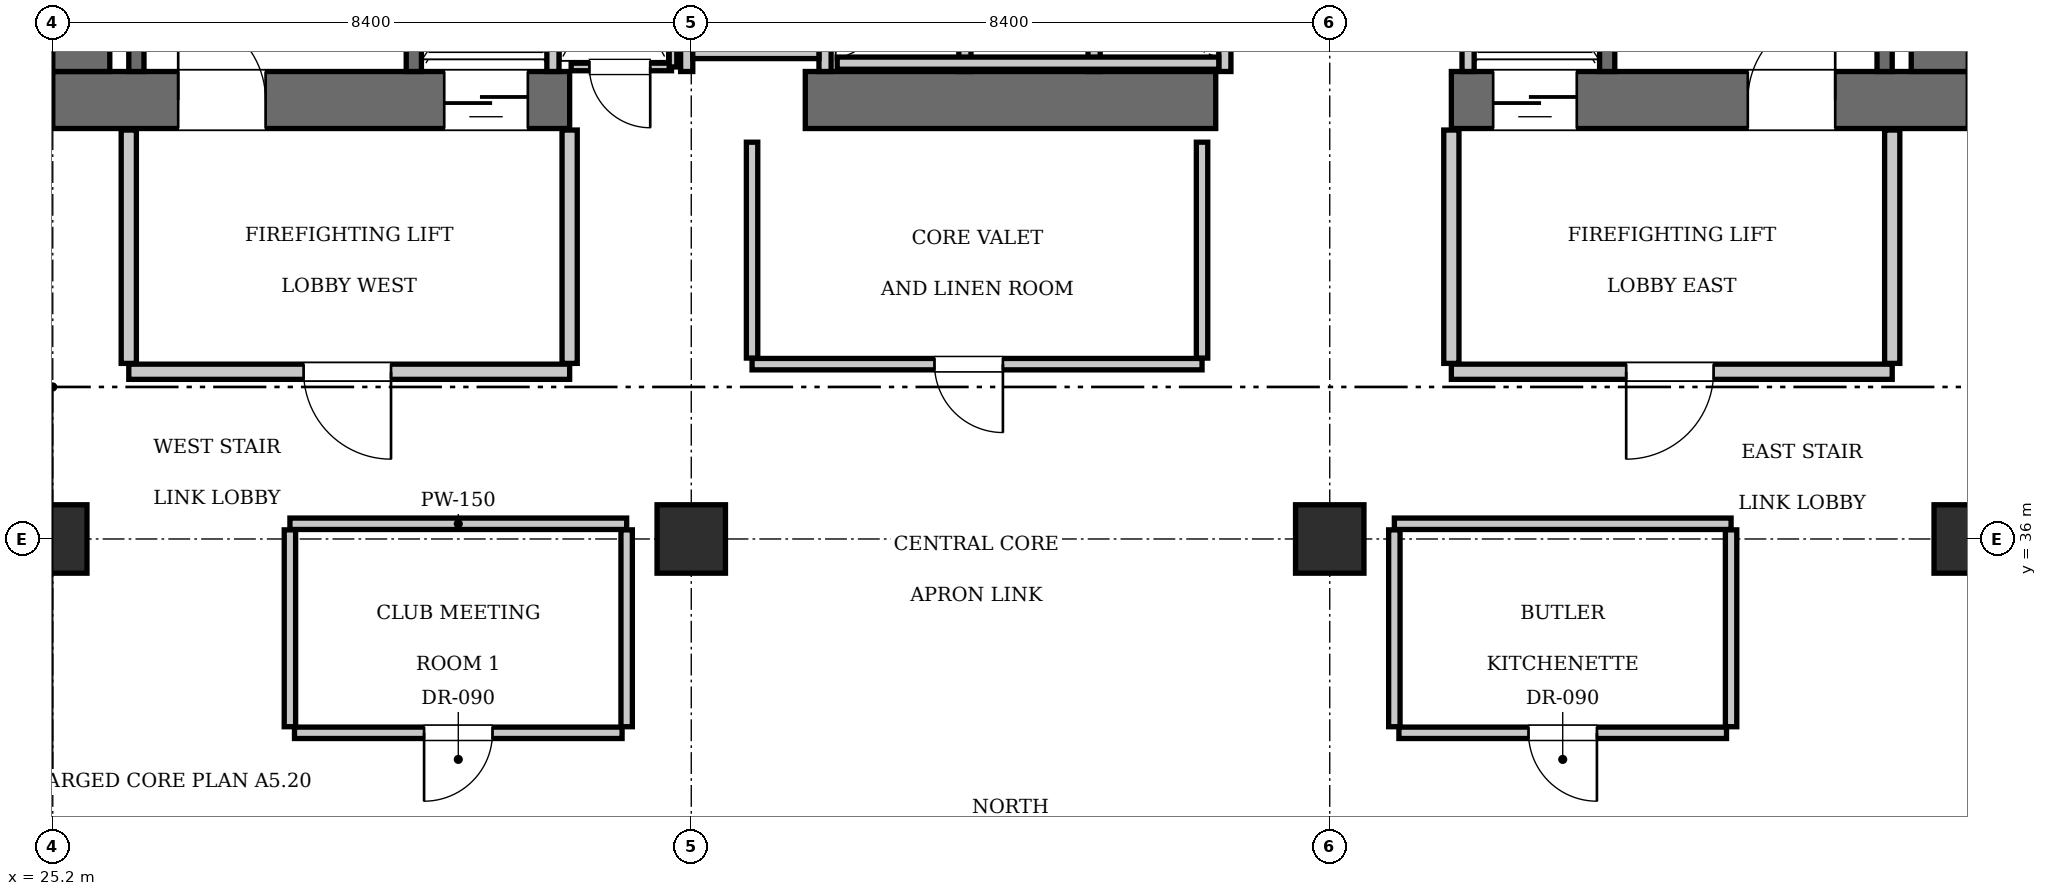
"""IFC4 building model, lengths in metres.
Left out: names, types, materials, properties, quantities, classifications, styles, units other than length and angle.
Written with IfcOpenShell. Run it as: python <this file> out.ifc"""

import sys

from ifc_helpers import new_model, si_unit, direction, frame, frame_2d, origin, origin_2d, place, context, subcontext, project, spatial, rectangle, extrude, element, fill, save


model = new_model("IFC4")
c1 = context("Model", 3, precision=1e-05, world=origin(), true_north=direction((0.0, 1.0)))
c2 = subcontext(c1, "Body", "Model", "MODEL_VIEW")
j1 = project(units=[si_unit("LENGTHUNIT", "METRE"), si_unit("PLANEANGLEUNIT", "RADIAN")], contexts=[c1])
p1 = place(None, origin())
s1 = spatial("IfcSite", under=j1, at=p1, CompositionType="ELEMENT")
p2 = place(p1, origin())
s2 = spatial("IfcBuilding", under=s1, at=p2, CompositionType="ELEMENT")
p3 = place(p2, frame((0.0, 0.0, 138.95)))
s3 = spatial("IfcBuildingStorey", under=s2, at=p3, CompositionType="ELEMENT", Elevation=138.95)
p4 = place(p3, frame((25.2, 41.775, 0.0), z_axis=(0.0, 0.0, 1.0), x_axis=(1.0, 0.0, 0.0)))
e1 = element("IfcWall", 1, at=p4, inside=s3, PredefinedType="SHEAR", context=c2, shape_type="SweptSolid", body=[
    extrude(rectangle(XDim=6.8, YDim=0.75, at=frame_2d((3.4, 0.0))), origin(), (0.0, 0.0, 1.0), 3.85),
])
p5 = place(p4, frame((1.65, 0.0, 0.0)))
e2 = element("IfcOpeningElement", 2, at=p5, cuts=e1, PredefinedType="OPENING", context=c2, shape_type="SweptSolid", body=[
    extrude(rectangle(XDim=1.15, YDim=2.15, at=frame_2d((0.575, 1.075))), frame((0.0, 0.385, 0.0), z_axis=(0.0, -1.0, 0.0), x_axis=(1.0, 0.0, 0.0)), (0.0, 0.0, 1.0), 0.77),
])
p6 = place(p4, frame((5.15, 0.0, 0.0)))
e3 = element("IfcOpeningElement", 3, at=p6, cuts=e1, PredefinedType="OPENING", context=c2, shape_type="SweptSolid", body=[
    extrude(rectangle(XDim=1.1, YDim=2.2, at=frame_2d((0.55, 1.1))), frame((0.0, 0.385, 0.0), z_axis=(0.0, -1.0, 0.0), x_axis=(1.0, 0.0, 0.0)), (0.0, 0.0, 1.0), 0.77),
])
p7 = place(p3, frame((35.1, 41.775, 0.0), z_axis=(0.0, 0.0, 1.0), x_axis=(1.0, 0.0, 0.0)))
e4 = element("IfcWall", 4, at=p7, inside=s3, PredefinedType="SHEAR", context=c2, shape_type="SweptSolid", body=[
    extrude(rectangle(XDim=5.4, YDim=0.75, at=frame_2d((2.7, 0.0))), origin(), (0.0, 0.0, 1.0), 3.85),
])
p8 = place(p3, frame((43.6, 41.775, 0.0), z_axis=(0.0, 0.0, 1.0), x_axis=(1.0, 0.0, 0.0)))
e5 = element("IfcWall", 5, at=p8, inside=s3, PredefinedType="SHEAR", context=c2, shape_type="SweptSolid", body=[
    extrude(rectangle(XDim=6.8, YDim=0.75, at=frame_2d((3.4, 0.0))), origin(), (0.0, 0.0, 1.0), 3.85),
])
p9 = place(p8, frame((3.9, 0.0, 0.0)))
e6 = element("IfcOpeningElement", 6, at=p9, cuts=e5, PredefinedType="OPENING", context=c2, shape_type="SweptSolid", body=[
    extrude(rectangle(XDim=1.15, YDim=2.15, at=frame_2d((0.575, 1.075))), frame((0.0, 0.385, 0.0), z_axis=(0.0, -1.0, 0.0), x_axis=(1.0, 0.0, 0.0)), (0.0, 0.0, 1.0), 0.77),
])
p10 = place(p8, frame((0.55, 0.0, 0.0)))
e7 = element("IfcOpeningElement", 7, at=p10, cuts=e5, PredefinedType="OPENING", context=c2, shape_type="SweptSolid", body=[
    extrude(rectangle(XDim=1.1, YDim=2.2, at=frame_2d((0.55, 1.1))), frame((0.0, 0.385, 0.0), z_axis=(0.0, -1.0, 0.0), x_axis=(1.0, 0.0, 0.0)), (0.0, 0.0, 1.0), 0.77),
])
for number, where, z_axis, x_axis in (
    (8, (25.575, 42.15, 0.0), (0.0, 0.0, 1.0), (0.0, 1.0, 0.0)),
    (9, (50.025, 42.15, 0.0), (0.0, 0.0, 1.0), (0.0, 1.0, 0.0)),
):
    element("IfcWall", number, at=place(p3, frame(where, z_axis=z_axis, x_axis=x_axis)), inside=s3, PredefinedType="SHEAR", context=c2, shape_type="SweptSolid", body=[
        extrude(rectangle(XDim=1.9, YDim=0.75, at=frame_2d((0.95, 0.0))), origin(), (0.0, 0.0, 1.0), 3.85),
    ])
for number, where, z_axis, x_axis in (
    (10, (25.2, 36.0, 0.0), (0.0, 0.0, 1.0), (1.0, 0.0, 0.0)),
    (11, (33.6, 36.0, 0.0), (0.0, 0.0, 1.0), (1.0, 0.0, 0.0)),
    (12, (42.0, 36.0, 0.0), (0.0, 0.0, 1.0), (1.0, 0.0, 0.0)),
    (13, (50.4, 36.0, 0.0), (0.0, 0.0, 1.0), (1.0, 0.0, 0.0)),
):
    element("IfcColumn", number, at=place(p3, frame(where, z_axis=z_axis, x_axis=x_axis)), inside=s3, PredefinedType="COLUMN", context=c2, shape_type="SweptSolid", body=[
        extrude(rectangle(XDim=0.9, YDim=0.9, at=origin_2d()), origin(), (0.0, 0.0, 1.0), 3.85),
    ])
p11 = place(p3, frame((29.95, 42.15, 0.0), z_axis=(0.0, 0.0, 1.0), x_axis=(0.0, 1.0, 0.0)))
e14 = element("IfcWall", 14, at=p11, inside=s3, PredefinedType="SOLIDWALL", context=c2, shape_type="SweptSolid", body=[
    extrude(rectangle(XDim=9.0, YDim=0.2, at=frame_2d((4.5, 0.0))), origin(), (0.0, 0.0, 1.0), 3.61),
])
p12 = place(p3, frame((26.3, 42.15, 0.0), z_axis=(0.0, 0.0, 1.0), x_axis=(0.0, 1.0, 0.0)))
e15 = element("IfcWall", 15, at=p12, inside=s3, PredefinedType="SOLIDWALL", context=c2, shape_type="SweptSolid", body=[
    extrude(rectangle(XDim=1.87, YDim=0.2, at=frame_2d((0.935, 0.0))), origin(), (0.0, 0.0, 1.0), 3.61),
])
p13 = place(p3, frame((45.65, 42.15, 0.0), z_axis=(0.0, 0.0, 1.0), x_axis=(0.0, 1.0, 0.0)))
e16 = element("IfcWall", 16, at=p13, inside=s3, PredefinedType="SOLIDWALL", context=c2, shape_type="SweptSolid", body=[
    extrude(rectangle(XDim=9.0, YDim=0.2, at=frame_2d((4.5, 0.0))), origin(), (0.0, 0.0, 1.0), 3.61),
])
p14 = place(p3, frame((49.3, 42.15, 0.0), z_axis=(0.0, 0.0, 1.0), x_axis=(0.0, 1.0, 0.0)))
e17 = element("IfcWall", 17, at=p14, inside=s3, PredefinedType="SOLIDWALL", context=c2, shape_type="SweptSolid", body=[
    extrude(rectangle(XDim=1.87, YDim=0.2, at=frame_2d((0.935, 0.0))), origin(), (0.0, 0.0, 1.0), 3.61),
])
for number, where, z_axis, x_axis in (
    (18, (31.78, 42.15, 0.0), (0.0, 0.0, 1.0), (0.0, 1.0, 0.0)),
    (19, (43.82, 42.15, 0.0), (0.0, 0.0, 1.0), (0.0, 1.0, 0.0)),
):
    element("IfcWall", number, at=place(p3, frame(where, z_axis=z_axis, x_axis=x_axis)), inside=s3, PredefinedType="SOLIDWALL", context=c2, shape_type="SweptSolid", body=[
        extrude(rectangle(XDim=2.59, YDim=0.16, at=frame_2d((1.295, 0.0))), origin(), (0.0, 0.0, 1.0), 3.61),
    ])
for number, where, z_axis, x_axis in (
    (20, (37.2, 42.15, 0.0), (0.0, 0.0, 1.0), (0.0, 1.0, 0.0)),
    (21, (38.9, 42.15, 0.0), (0.0, 0.0, 1.0), (0.0, 1.0, 0.0)),
    (22, (40.62, 42.15, 0.0), (0.0, 0.0, 1.0), (0.0, 1.0, 0.0)),
):
    element("IfcWall", number, at=place(p3, frame(where, z_axis=z_axis, x_axis=x_axis)), inside=s3, PredefinedType="SOLIDWALL", context=c2, shape_type="SweptSolid", body=[
        extrude(rectangle(XDim=2.2, YDim=0.16, at=frame_2d((1.1, 0.0))), origin(), (0.0, 0.0, 1.0), 3.61),
    ])
p15 = place(p3, frame((35.52, 42.26, 0.0), z_axis=(0.0, 0.0, 1.0), x_axis=(1.0, 0.0, 0.0)))
e23 = element("IfcWall", 23, at=p15, inside=s3, PredefinedType="SOLIDWALL", context=c2, shape_type="SweptSolid", body=[
    extrude(rectangle(XDim=5.02, YDim=0.16, at=frame_2d((2.51, 0.0))), origin(), (0.0, 0.0, 1.0), 3.61),
])
for number, where, z_axis, x_axis in (
    (24, (33.54, 42.15, 0.0), (0.0, 0.0, 1.0), (0.0, 1.0, 0.0)),
    (25, (35.36, 42.15, 0.0), (0.0, 0.0, 1.0), (0.0, 1.0, 0.0)),
):
    element("IfcWall", number, at=place(p3, frame(where, z_axis=z_axis, x_axis=x_axis)), inside=s3, PredefinedType="SOLIDWALL", context=c2, shape_type="SweptSolid", body=[
        extrude(rectangle(XDim=2.25, YDim=0.16, at=frame_2d((1.125, 0.0))), origin(), (0.0, 0.0, 1.0), 3.61),
    ])
p16 = place(p3, frame((33.62, 42.4, 0.0), z_axis=(0.0, 0.0, 1.0), x_axis=(1.0, 0.0, 0.0)))
e26 = element("IfcWall", 26, at=p16, inside=s3, PredefinedType="SOLIDWALL", context=c2, shape_type="SweptSolid", body=[
    extrude(rectangle(XDim=1.66, YDim=0.16, at=frame_2d((0.83, 0.0))), origin(), (0.0, 0.0, 1.0), 3.61),
])
p17 = place(p3, frame((26.2, 38.2, 0.0), z_axis=(0.0, 0.0, 1.0), x_axis=(1.0, 0.0, 0.0)))
e27 = element("IfcWall", 27, at=p17, inside=s3, PredefinedType="PARTITIONING", context=c2, shape_type="SweptSolid", body=[
    extrude(rectangle(XDim=5.8, YDim=0.2, at=frame_2d((2.9, 0.0))), origin(), (0.0, 0.0, 1.0), 3.61),
])
p18 = place(p17, frame((2.3, 0.0, 0.0)))
e28 = element("IfcOpeningElement", 28, at=p18, cuts=e27, PredefinedType="OPENING", context=c2, shape_type="SweptSolid", body=[
    extrude(rectangle(XDim=1.15, YDim=2.15, at=frame_2d((0.575, 1.075))), frame((0.0, 0.11, 0.0), z_axis=(0.0, -1.0, 0.0), x_axis=(1.0, 0.0, 0.0)), (0.0, 0.0, 1.0), 0.22),
])
for number, where, z_axis, x_axis in (
    (29, (26.2, 38.31, 0.0), (0.0, 0.0, 1.0), (0.0, 1.0, 0.0)),
    (30, (32.0, 38.31, 0.0), (0.0, 0.0, 1.0), (0.0, 1.0, 0.0)),
):
    element("IfcWall", number, at=place(p3, frame(where, z_axis=z_axis, x_axis=x_axis)), inside=s3, PredefinedType="PARTITIONING", context=c2, shape_type="SweptSolid", body=[
        extrude(rectangle(XDim=3.07, YDim=0.2, at=frame_2d((1.535, 0.0))), origin(), (0.0, 0.0, 1.0), 3.61),
    ])
p19 = place(p3, frame((43.6, 38.2, 0.0), z_axis=(0.0, 0.0, 1.0), x_axis=(1.0, 0.0, 0.0)))
e31 = element("IfcWall", 31, at=p19, inside=s3, PredefinedType="PARTITIONING", context=c2, shape_type="SweptSolid", body=[
    extrude(rectangle(XDim=5.8, YDim=0.2, at=frame_2d((2.9, 0.0))), origin(), (0.0, 0.0, 1.0), 3.61),
])
p20 = place(p19, frame((2.3, 0.0, 0.0)))
e32 = element("IfcOpeningElement", 32, at=p20, cuts=e31, PredefinedType="OPENING", context=c2, shape_type="SweptSolid", body=[
    extrude(rectangle(XDim=1.15, YDim=2.15, at=frame_2d((0.575, 1.075))), frame((0.0, 0.11, 0.0), z_axis=(0.0, -1.0, 0.0), x_axis=(1.0, 0.0, 0.0)), (0.0, 0.0, 1.0), 0.22),
])
for number, where, z_axis, x_axis in (
    (33, (43.6, 38.31, 0.0), (0.0, 0.0, 1.0), (0.0, 1.0, 0.0)),
    (34, (49.4, 38.31, 0.0), (0.0, 0.0, 1.0), (0.0, 1.0, 0.0)),
):
    element("IfcWall", number, at=place(p3, frame(where, z_axis=z_axis, x_axis=x_axis)), inside=s3, PredefinedType="PARTITIONING", context=c2, shape_type="SweptSolid", body=[
        extrude(rectangle(XDim=3.07, YDim=0.2, at=frame_2d((1.535, 0.0))), origin(), (0.0, 0.0, 1.0), 3.61),
    ])
p21 = place(p3, frame((32.02, 42.21, 0.0), z_axis=(0.0, 0.0, 1.0), x_axis=(1.0, 0.0, 0.0)))
e35 = element("IfcWall", 35, at=p21, inside=s3, PredefinedType="PARTITIONING", context=c2, shape_type="SweptSolid", body=[
    extrude(rectangle(XDim=1.32, YDim=0.1, at=frame_2d((0.66, 0.0))), origin(), (0.0, 0.0, 1.0), 3.61),
])
p22 = place(p21, frame((0.24, 0.0, 0.0)))
e36 = element("IfcOpeningElement", 36, at=p22, cuts=e35, PredefinedType="OPENING", context=c2, shape_type="SweptSolid", body=[
    extrude(rectangle(XDim=0.8, YDim=2.05, at=frame_2d((0.4, 1.025))), frame((0.0, 0.06, 0.0), z_axis=(0.0, -1.0, 0.0), x_axis=(1.0, 0.0, 0.0)), (0.0, 0.0, 1.0), 0.12),
])
p23 = place(p3, frame((33.36, 42.21, 0.0), z_axis=(0.0, 0.0, 1.0), x_axis=(0.0, 1.0, 0.0)))
e37 = element("IfcWall", 37, at=p23, inside=s3, PredefinedType="PARTITIONING", context=c2, shape_type="SweptSolid", body=[
    extrude(rectangle(XDim=2.73, YDim=0.1, at=frame_2d((1.365, 0.0))), origin(), (0.0, 0.0, 1.0), 3.61),
])
p24 = place(p3, frame((34.4, 38.3, 0.0), z_axis=(0.0, 0.0, 1.0), x_axis=(1.0, 0.0, 0.0)))
e38 = element("IfcWall", 38, at=p24, inside=s3, PredefinedType="PARTITIONING", context=c2, shape_type="SweptSolid", body=[
    extrude(rectangle(XDim=5.92, YDim=0.15, at=frame_2d((2.96, 0.0))), origin(), (0.0, 0.0, 1.0), 3.61),
])
p25 = place(p24, frame((2.4, 0.0, 0.0)))
e39 = element("IfcOpeningElement", 39, at=p25, cuts=e38, PredefinedType="OPENING", context=c2, shape_type="SweptSolid", body=[
    extrude(rectangle(XDim=0.9, YDim=2.1, at=frame_2d((0.45, 1.05))), frame((0.0, 0.085, 0.0), z_axis=(0.0, -1.0, 0.0), x_axis=(1.0, 0.0, 0.0)), (0.0, 0.0, 1.0), 0.17),
])
for number, where, z_axis, x_axis in (
    (40, (34.4, 38.38, 0.0), (0.0, 0.0, 1.0), (0.0, 1.0, 0.0)),
    (41, (40.32, 38.38, 0.0), (0.0, 0.0, 1.0), (0.0, 1.0, 0.0)),
):
    element("IfcWall", number, at=place(p3, frame(where, z_axis=z_axis, x_axis=x_axis)), inside=s3, PredefinedType="PARTITIONING", context=c2, shape_type="SweptSolid", body=[
        extrude(rectangle(XDim=2.84, YDim=0.15, at=frame_2d((1.42, 0.0))), origin(), (0.0, 0.0, 1.0), 3.61),
    ])
p26 = place(p3, frame((28.32, 36.2, 0.0), z_axis=(0.0, 0.0, 1.0), x_axis=(1.0, 0.0, 0.0)))
e42 = element("IfcWall", 42, at=p26, inside=s3, PredefinedType="PARTITIONING", context=c2, shape_type="SweptSolid", body=[
    extrude(rectangle(XDim=4.43, YDim=0.15, at=frame_2d((2.215, 0.0))), origin(), (0.0, 0.0, 1.0), 3.61),
])
for number, where, z_axis, x_axis in (
    (43, (28.32, 33.53, 0.0), (0.0, 0.0, 1.0), (0.0, 1.0, 0.0)),
    (44, (32.75, 33.53, 0.0), (0.0, 0.0, 1.0), (0.0, 1.0, 0.0)),
):
    element("IfcWall", number, at=place(p3, frame(where, z_axis=z_axis, x_axis=x_axis)), inside=s3, PredefinedType="PARTITIONING", context=c2, shape_type="SweptSolid", body=[
        extrude(rectangle(XDim=2.59, YDim=0.15, at=frame_2d((1.295, 0.0))), origin(), (0.0, 0.0, 1.0), 3.61),
    ])
p27 = place(p3, frame((28.38, 33.45, 0.0), z_axis=(0.0, 0.0, 1.0), x_axis=(1.0, 0.0, 0.0)))
e45 = element("IfcWall", 45, at=p27, inside=s3, PredefinedType="PARTITIONING", context=c2, shape_type="SweptSolid", body=[
    extrude(rectangle(XDim=4.31, YDim=0.15, at=frame_2d((2.155, 0.0))), origin(), (0.0, 0.0, 1.0), 3.61),
])
p28 = place(p27, frame((1.705, 0.0, 0.0)))
e46 = element("IfcOpeningElement", 46, at=p28, cuts=e45, PredefinedType="OPENING", context=c2, shape_type="SweptSolid", body=[
    extrude(rectangle(XDim=0.9, YDim=2.1, at=frame_2d((0.45, 1.05))), frame((0.0, 0.085, 0.0), z_axis=(0.0, -1.0, 0.0), x_axis=(1.0, 0.0, 0.0)), (0.0, 0.0, 1.0), 0.17),
])
p29 = place(p3, frame((42.85, 36.2, 0.0), z_axis=(0.0, 0.0, 1.0), x_axis=(1.0, 0.0, 0.0)))
e47 = element("IfcWall", 47, at=p29, inside=s3, PredefinedType="PARTITIONING", context=c2, shape_type="SweptSolid", body=[
    extrude(rectangle(XDim=4.43, YDim=0.15, at=frame_2d((2.215, 0.0))), origin(), (0.0, 0.0, 1.0), 3.61),
])
for number, where, z_axis, x_axis in (
    (48, (42.85, 33.53, 0.0), (0.0, 0.0, 1.0), (0.0, 1.0, 0.0)),
    (49, (47.28, 33.53, 0.0), (0.0, 0.0, 1.0), (0.0, 1.0, 0.0)),
):
    element("IfcWall", number, at=place(p3, frame(where, z_axis=z_axis, x_axis=x_axis)), inside=s3, PredefinedType="PARTITIONING", context=c2, shape_type="SweptSolid", body=[
        extrude(rectangle(XDim=2.59, YDim=0.15, at=frame_2d((1.295, 0.0))), origin(), (0.0, 0.0, 1.0), 3.61),
    ])
p30 = place(p3, frame((42.91, 33.45, 0.0), z_axis=(0.0, 0.0, 1.0), x_axis=(1.0, 0.0, 0.0)))
e50 = element("IfcWall", 50, at=p30, inside=s3, PredefinedType="PARTITIONING", context=c2, shape_type="SweptSolid", body=[
    extrude(rectangle(XDim=4.31, YDim=0.15, at=frame_2d((2.155, 0.0))), origin(), (0.0, 0.0, 1.0), 3.61),
])
p31 = place(p30, frame((1.705, 0.0, 0.0)))
e51 = element("IfcOpeningElement", 51, at=p31, cuts=e50, PredefinedType="OPENING", context=c2, shape_type="SweptSolid", body=[
    extrude(rectangle(XDim=0.9, YDim=2.1, at=frame_2d((0.45, 1.05))), frame((0.0, 0.085, 0.0), z_axis=(0.0, -1.0, 0.0), x_axis=(1.0, 0.0, 0.0)), (0.0, 0.0, 1.0), 0.17),
])
p32 = place(p5, origin())
e52 = element("IfcDoor", 52, at=p32, inside=s3, OperationType="SINGLE_SWING_LEFT", PredefinedType="DOOR", context=c2, shape_type="SweptSolid", body=[
    extrude(rectangle(XDim=1.15, YDim=2.15, at=frame_2d((0.575, 1.075))), frame((0.0, 0.025, 0.0), z_axis=(0.0, -1.0, 0.0), x_axis=(1.0, 0.0, 0.0)), (0.0, 0.0, 1.0), 0.05),
])
fill(e2, e52)
p33 = place(p9, origin())
e53 = element("IfcDoor", 53, at=p33, inside=s3, OperationType="SINGLE_SWING_RIGHT", PredefinedType="DOOR", context=c2, shape_type="SweptSolid", body=[
    extrude(rectangle(XDim=1.15, YDim=2.15, at=frame_2d((0.575, 1.075))), frame((0.0, 0.025, 0.0), z_axis=(0.0, -1.0, 0.0), x_axis=(1.0, 0.0, 0.0)), (0.0, 0.0, 1.0), 0.05),
])
fill(e6, e53)
p34 = place(p6, frame((1.1, 0.0, 0.0), z_axis=(0.0, 0.0, 1.0), x_axis=(-1.0, 0.0, 0.0)))
e54 = element("IfcDoor", 54, at=p34, inside=s3, OperationType="SLIDING_TO_LEFT", PredefinedType="DOOR", context=c2, shape_type="SweptSolid", body=[
    extrude(rectangle(XDim=1.1, YDim=2.2, at=frame_2d((0.55, 1.1))), frame((0.0, 0.025, 0.0), z_axis=(0.0, -1.0, 0.0), x_axis=(1.0, 0.0, 0.0)), (0.0, 0.0, 1.0), 0.05),
])
fill(e3, e54)
p35 = place(p10, frame((1.1, 0.0, 0.0), z_axis=(0.0, 0.0, 1.0), x_axis=(-1.0, 0.0, 0.0)))
e55 = element("IfcDoor", 55, at=p35, inside=s3, OperationType="SLIDING_TO_LEFT", PredefinedType="DOOR", context=c2, shape_type="SweptSolid", body=[
    extrude(rectangle(XDim=1.1, YDim=2.2, at=frame_2d((0.55, 1.1))), frame((0.0, 0.025, 0.0), z_axis=(0.0, -1.0, 0.0), x_axis=(1.0, 0.0, 0.0)), (0.0, 0.0, 1.0), 0.05),
])
fill(e7, e55)
p36 = place(p18, frame((1.15, 0.0, 0.0), z_axis=(0.0, 0.0, 1.0), x_axis=(-1.0, 0.0, 0.0)))
e56 = element("IfcDoor", 56, at=p36, inside=s3, OperationType="SINGLE_SWING_LEFT", PredefinedType="DOOR", context=c2, shape_type="SweptSolid", body=[
    extrude(rectangle(XDim=1.15, YDim=2.15, at=frame_2d((0.575, 1.075))), frame((0.0, 0.025, 0.0), z_axis=(0.0, -1.0, 0.0), x_axis=(1.0, 0.0, 0.0)), (0.0, 0.0, 1.0), 0.05),
])
fill(e28, e56)
p37 = place(p20, frame((1.15, 0.0, 0.0), z_axis=(0.0, 0.0, 1.0), x_axis=(-1.0, 0.0, 0.0)))
e57 = element("IfcDoor", 57, at=p37, inside=s3, OperationType="SINGLE_SWING_RIGHT", PredefinedType="DOOR", context=c2, shape_type="SweptSolid", body=[
    extrude(rectangle(XDim=1.15, YDim=2.15, at=frame_2d((0.575, 1.075))), frame((0.0, 0.025, 0.0), z_axis=(0.0, -1.0, 0.0), x_axis=(1.0, 0.0, 0.0)), (0.0, 0.0, 1.0), 0.05),
])
fill(e32, e57)
p38 = place(p22, frame((0.8, 0.0, 0.0), z_axis=(0.0, 0.0, 1.0), x_axis=(-1.0, 0.0, 0.0)))
e58 = element("IfcDoor", 58, at=p38, inside=s3, OperationType="SINGLE_SWING_LEFT", PredefinedType="DOOR", context=c2, shape_type="SweptSolid", body=[
    extrude(rectangle(XDim=0.8, YDim=2.05, at=frame_2d((0.4, 1.025))), frame((0.0, 0.025, 0.0), z_axis=(0.0, -1.0, 0.0), x_axis=(1.0, 0.0, 0.0)), (0.0, 0.0, 1.0), 0.05),
])
fill(e36, e58)
p39 = place(p25, frame((0.9, 0.0, 0.0), z_axis=(0.0, 0.0, 1.0), x_axis=(-1.0, 0.0, 0.0)))
e59 = element("IfcDoor", 59, at=p39, inside=s3, OperationType="SINGLE_SWING_LEFT", PredefinedType="DOOR", context=c2, shape_type="SweptSolid", body=[
    extrude(rectangle(XDim=0.9, YDim=2.1, at=frame_2d((0.45, 1.05))), frame((0.0, 0.025, 0.0), z_axis=(0.0, -1.0, 0.0), x_axis=(1.0, 0.0, 0.0)), (0.0, 0.0, 1.0), 0.05),
])
fill(e39, e59)
p40 = place(p28, frame((0.9, 0.0, 0.0), z_axis=(0.0, 0.0, 1.0), x_axis=(-1.0, 0.0, 0.0)))
e60 = element("IfcDoor", 60, at=p40, inside=s3, OperationType="SINGLE_SWING_RIGHT", PredefinedType="DOOR", context=c2, shape_type="SweptSolid", body=[
    extrude(rectangle(XDim=0.9, YDim=2.1, at=frame_2d((0.45, 1.05))), frame((0.0, 0.025, 0.0), z_axis=(0.0, -1.0, 0.0), x_axis=(1.0, 0.0, 0.0)), (0.0, 0.0, 1.0), 0.05),
])
fill(e46, e60)
p41 = place(p31, frame((0.9, 0.0, 0.0), z_axis=(0.0, 0.0, 1.0), x_axis=(-1.0, 0.0, 0.0)))
e61 = element("IfcDoor", 61, at=p41, inside=s3, OperationType="SINGLE_SWING_LEFT", PredefinedType="DOOR", context=c2, shape_type="SweptSolid", body=[
    extrude(rectangle(XDim=0.9, YDim=2.1, at=frame_2d((0.45, 1.05))), frame((0.0, 0.025, 0.0), z_axis=(0.0, -1.0, 0.0), x_axis=(1.0, 0.0, 0.0)), (0.0, 0.0, 1.0), 0.05),
])
fill(e51, e61)
save(model, sys.argv[1])
